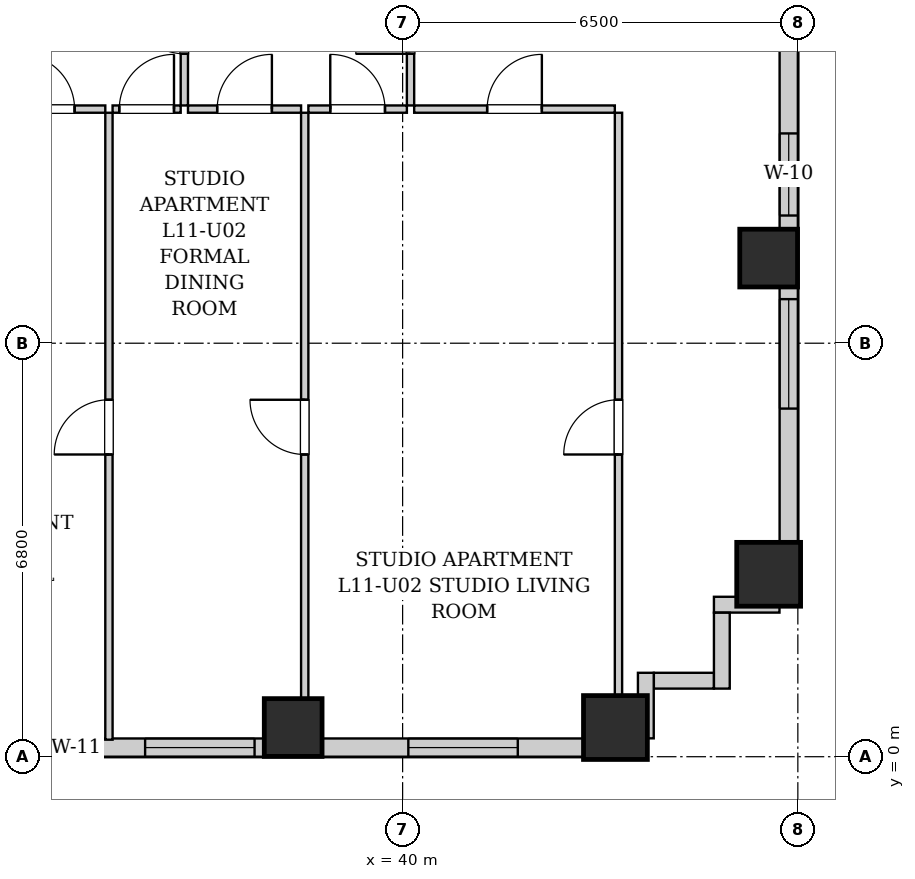
"""IFC4 building model, lengths in metres.
Left out: names, types, materials, properties, quantities, classifications, styles, units other than length and angle.
Written with IfcOpenShell. Run it as: python <this file> out.ifc"""

import sys

from ifc_helpers import new_model, si_unit, direction, frame, frame_2d, origin, origin_2d, place, context, subcontext, project, spatial, rectangle, extrude, element, fill, save


model = new_model("IFC4")
c1 = context("Model", 3, precision=1e-05, world=origin(), true_north=direction((0.0, 1.0)))
c2 = subcontext(c1, "Body", "Model", "MODEL_VIEW")
j1 = project(units=[si_unit("LENGTHUNIT", "METRE"), si_unit("PLANEANGLEUNIT", "RADIAN")], contexts=[c1])
p1 = place(None, origin())
s1 = spatial("IfcSite", under=j1, at=p1, CompositionType="ELEMENT")
p2 = place(p1, origin())
s2 = spatial("IfcBuilding", under=s1, at=p2, CompositionType="ELEMENT")
p3 = place(p2, frame((0.0, 0.0, 45.0)))
s3 = spatial("IfcBuildingStorey", under=s2, at=p3, CompositionType="ELEMENT", Elevation=45.0)
p4 = place(p3, frame((38.2, 0.48, 0.0), z_axis=(0.0, 0.0, 1.0), x_axis=(1.0, 0.0, 0.0)))
e1 = element("IfcColumn", 1, at=p4, inside=s3, PredefinedType="COLUMN", context=c2, shape_type="SweptSolid", body=[
    extrude(rectangle(XDim=0.95, YDim=0.95, at=origin_2d()), origin(), (0.0, 0.0, 1.0), 3.2),
])
for number, where, z_axis, x_axis in (
    (2, (43.5, 0.48, 0.0), (0.0, 0.0, 1.0), (1.0, 0.0, 0.0)),
    (3, (46.02, 3.0, 0.0), (0.0, 0.0, 1.0), (1.0, 0.0, 0.0)),
):
    element("IfcColumn", number, at=place(p3, frame(where, z_axis=z_axis, x_axis=x_axis)), inside=s3, PredefinedType="COLUMN", context=c2, shape_type="SweptSolid", body=[
        extrude(rectangle(XDim=1.05, YDim=1.05, at=origin_2d()), origin(), (0.0, 0.0, 1.0), 3.2),
    ])
p5 = place(p3, frame((46.02, 8.2, 0.0), z_axis=(0.0, 0.0, 1.0), x_axis=(1.0, 0.0, 0.0)))
e4 = element("IfcColumn", 4, at=p5, inside=s3, PredefinedType="COLUMN", context=c2, shape_type="SweptSolid", body=[
    extrude(rectangle(XDim=0.95, YDim=0.95, at=origin_2d()), origin(), (0.0, 0.0, 1.0), 3.2),
])
p6 = place(p3, frame((46.35, 45.1, 0.0), z_axis=(0.0, 0.0, 1.0), x_axis=(0.0, -1.0, 0.0)))
e5 = element("IfcWall", 5, at=p6, inside=s3, PredefinedType="SOLIDWALL", context=c2, shape_type="SweptSolid", body=[
    extrude(rectangle(XDim=42.6, YDim=0.3, at=frame_2d((21.3, 0.0))), origin(), (0.0, 0.0, 1.0), 1.975),
])
p7 = place(p6, frame((37.575, 0.0, 0.55)))
e6 = element("IfcOpeningElement", 6, at=p7, cuts=e5, PredefinedType="OPENING", context=c2, shape_type="SweptSolid", body=[
    extrude(rectangle(XDim=1.8, YDim=1.2, at=frame_2d((0.9, 0.6))), frame((0.0, 0.16, 0.0), z_axis=(0.0, -1.0, 0.0), x_axis=(1.0, 0.0, 0.0)), (0.0, 0.0, 1.0), 0.32),
])
p8 = place(p6, frame((34.85, 0.0, 0.55)))
e7 = element("IfcOpeningElement", 7, at=p8, cuts=e5, PredefinedType="OPENING", context=c2, shape_type="SweptSolid", body=[
    extrude(rectangle(XDim=1.35, YDim=1.2, at=frame_2d((0.675, 0.6))), frame((0.0, 0.16, 0.0), z_axis=(0.0, -1.0, 0.0), x_axis=(1.0, 0.0, 0.0)), (0.0, 0.0, 1.0), 0.32),
])
p9 = place(p6, frame((3.665, 0.0, 0.55)))
e8 = element("IfcOpeningElement", 8, at=p9, cuts=e5, PredefinedType="OPENING", context=c2, shape_type="SweptSolid", body=[
    extrude(rectangle(XDim=1.8, YDim=1.2, at=frame_2d((0.9, 0.6))), frame((0.0, 0.16, 0.0), z_axis=(0.0, -1.0, 0.0), x_axis=(1.0, 0.0, 0.0)), (0.0, 0.0, 1.0), 0.32),
])
p10 = place(p6, frame((1.185, 0.0, 0.55)))
e9 = element("IfcOpeningElement", 9, at=p10, cuts=e5, PredefinedType="OPENING", context=c2, shape_type="SweptSolid", body=[
    extrude(rectangle(XDim=1.35, YDim=1.2, at=frame_2d((0.675, 0.6))), frame((0.0, 0.16, 0.0), z_axis=(0.0, -1.0, 0.0), x_axis=(1.0, 0.0, 0.0)), (0.0, 0.0, 1.0), 0.32),
])
p11 = place(p6, frame((27.225, 0.0, 0.55)))
e10 = element("IfcOpeningElement", 10, at=p11, cuts=e5, PredefinedType="OPENING", context=c2, shape_type="SweptSolid", body=[
    extrude(rectangle(XDim=1.8, YDim=1.2, at=frame_2d((0.9, 0.6))), frame((0.0, 0.16, 0.0), z_axis=(0.0, -1.0, 0.0), x_axis=(1.0, 0.0, 0.0)), (0.0, 0.0, 1.0), 0.32),
])
p12 = place(p6, frame((17.1, 0.0, 0.55)))
e11 = element("IfcOpeningElement", 11, at=p12, cuts=e5, PredefinedType="OPENING", context=c2, shape_type="SweptSolid", body=[
    extrude(rectangle(XDim=1.8, YDim=1.2, at=frame_2d((0.9, 0.6))), frame((0.0, 0.16, 0.0), z_axis=(0.0, -1.0, 0.0), x_axis=(1.0, 0.0, 0.0)), (0.0, 0.0, 1.0), 0.32),
])
p13 = place(p3, frame((44.0, 0.15, 0.0), z_axis=(0.0, 0.0, 1.0), x_axis=(-1.0, 0.0, 0.0)))
e12 = element("IfcWall", 12, at=p13, inside=s3, PredefinedType="SOLIDWALL", context=c2, shape_type="SweptSolid", body=[
    extrude(rectangle(XDim=25.7, YDim=0.3, at=frame_2d((12.85, 0.0))), origin(), (0.0, 0.0, 1.0), 1.975),
])
p14 = place(p13, frame((22.471, 0.0, 0.55)))
e13 = element("IfcOpeningElement", 13, at=p14, cuts=e12, PredefinedType="OPENING", context=c2, shape_type="SweptSolid", body=[
    extrude(rectangle(XDim=1.8, YDim=1.2, at=frame_2d((0.9, 0.6))), frame((0.0, 0.16, 0.0), z_axis=(0.0, -1.0, 0.0), x_axis=(1.0, 0.0, 0.0)), (0.0, 0.0, 1.0), 0.32),
])
p15 = place(p13, frame((15.65, 0.0, 0.55)))
e14 = element("IfcOpeningElement", 14, at=p15, cuts=e12, PredefinedType="OPENING", context=c2, shape_type="SweptSolid", body=[
    extrude(rectangle(XDim=0.85, YDim=1.2, at=frame_2d((0.425, 0.6))), frame((0.0, 0.16, 0.0), z_axis=(0.0, -1.0, 0.0), x_axis=(1.0, 0.0, 0.0)), (0.0, 0.0, 1.0), 0.32),
])
p16 = place(p13, frame((12.777, 0.0, 0.55)))
e15 = element("IfcOpeningElement", 15, at=p16, cuts=e12, PredefinedType="OPENING", context=c2, shape_type="SweptSolid", body=[
    extrude(rectangle(XDim=1.8, YDim=1.2, at=frame_2d((0.9, 0.6))), frame((0.0, 0.16, 0.0), z_axis=(0.0, -1.0, 0.0), x_axis=(1.0, 0.0, 0.0)), (0.0, 0.0, 1.0), 0.32),
])
p17 = place(p13, frame((9.315, 0.0, 0.55)))
e16 = element("IfcOpeningElement", 16, at=p17, cuts=e12, PredefinedType="OPENING", context=c2, shape_type="SweptSolid", body=[
    extrude(rectangle(XDim=0.85, YDim=1.2, at=frame_2d((0.425, 0.6))), frame((0.0, 0.16, 0.0), z_axis=(0.0, -1.0, 0.0), x_axis=(1.0, 0.0, 0.0)), (0.0, 0.0, 1.0), 0.32),
])
p18 = place(p13, frame((6.435, 0.0, 0.55)))
e17 = element("IfcOpeningElement", 17, at=p18, cuts=e12, PredefinedType="OPENING", context=c2, shape_type="SweptSolid", body=[
    extrude(rectangle(XDim=1.8, YDim=1.2, at=frame_2d((0.9, 0.6))), frame((0.0, 0.16, 0.0), z_axis=(0.0, -1.0, 0.0), x_axis=(1.0, 0.0, 0.0)), (0.0, 0.0, 1.0), 0.32),
])
p19 = place(p13, frame((2.106, 0.0, 0.55)))
e18 = element("IfcOpeningElement", 18, at=p19, cuts=e12, PredefinedType="OPENING", context=c2, shape_type="SweptSolid", body=[
    extrude(rectangle(XDim=1.8, YDim=1.2, at=frame_2d((0.9, 0.6))), frame((0.0, 0.16, 0.0), z_axis=(0.0, -1.0, 0.0), x_axis=(1.0, 0.0, 0.0)), (0.0, 0.0, 1.0), 0.32),
])
p20 = place(p3, frame((46.198, 2.5, 0.0), z_axis=(0.0, 0.0, 1.0), x_axis=(-1.0, 0.0, 0.0)))
e19 = element("IfcWall", 19, at=p20, inside=s3, PredefinedType="SOLIDWALL", context=c2, shape_type="SweptSolid", body=[
    extrude(rectangle(XDim=1.078, YDim=0.26, at=frame_2d((0.539, 0.0))), origin(), (0.0, 0.0, 1.0), 2.94),
])
p21 = place(p3, frame((45.25, 2.368, 0.0), z_axis=(0.0, 0.0, 1.0), x_axis=(0.0, -1.0, 0.0)))
e20 = element("IfcWall", 20, at=p21, inside=s3, PredefinedType="SOLIDWALL", context=c2, shape_type="SweptSolid", body=[
    extrude(rectangle(XDim=1.248, YDim=0.26, at=frame_2d((0.624, 0.0))), origin(), (0.0, 0.0, 1.0), 2.94),
])
p22 = place(p3, frame((45.118, 1.25, 0.0), z_axis=(0.0, 0.0, 1.0), x_axis=(-1.0, 0.0, 0.0)))
e21 = element("IfcWall", 21, at=p22, inside=s3, PredefinedType="SOLIDWALL", context=c2, shape_type="SweptSolid", body=[
    extrude(rectangle(XDim=0.986, YDim=0.26, at=frame_2d((0.493, 0.0))), origin(), (0.0, 0.0, 1.0), 2.94),
])
p23 = place(p3, frame((44.0, 1.38, 0.0), z_axis=(0.0, 0.0, 1.0), x_axis=(0.0, -1.0, 0.0)))
e22 = element("IfcWall", 22, at=p23, inside=s3, PredefinedType="SOLIDWALL", context=c2, shape_type="SweptSolid", body=[
    extrude(rectangle(XDim=1.078, YDim=0.26, at=frame_2d((0.539, 0.0))), origin(), (0.0, 0.0, 1.0), 2.94),
])
p24 = place(p3, frame((36.41, 10.71, 0.0), z_axis=(0.0, 0.0, 1.0), x_axis=(0.0, 1.0, 0.0)))
e23 = element("IfcWall", 23, at=p24, inside=s3, PredefinedType="PARTITIONING", context=c2, shape_type="SweptSolid", body=[
    extrude(rectangle(XDim=2.6, YDim=0.12, at=frame_2d((1.3, 0.0))), origin(), (0.0, 0.0, 1.0), 2.94),
])
p25 = place(p24, frame((0.85, 0.0, 0.0)))
e24 = element("IfcOpeningElement", 24, at=p25, cuts=e23, PredefinedType="OPENING", context=c2, shape_type="SweptSolid", body=[
    extrude(rectangle(XDim=0.9, YDim=2.05, at=frame_2d((0.45, 1.025))), frame((0.0, 0.07, 0.0), z_axis=(0.0, -1.0, 0.0), x_axis=(1.0, 0.0, 0.0)), (0.0, 0.0, 1.0), 0.14),
])
p26 = place(p3, frame((33.2, 10.65, 0.0), z_axis=(0.0, 0.0, 1.0), x_axis=(1.0, 0.0, 0.0)))
e25 = element("IfcWall", 25, at=p26, inside=s3, PredefinedType="PARTITIONING", context=c2, shape_type="SweptSolid", body=[
    extrude(rectangle(XDim=1.91, YDim=0.12, at=frame_2d((0.955, 0.0))), origin(), (0.0, 0.0, 1.0), 2.94),
])
p27 = place(p26, frame((0.505, 0.0, 0.0)))
e26 = element("IfcOpeningElement", 26, at=p27, cuts=e25, PredefinedType="OPENING", context=c2, shape_type="SweptSolid", body=[
    extrude(rectangle(XDim=0.9, YDim=2.05, at=frame_2d((0.45, 1.025))), frame((0.0, 0.07, 0.0), z_axis=(0.0, -1.0, 0.0), x_axis=(1.0, 0.0, 0.0)), (0.0, 0.0, 1.0), 0.14),
])
p28 = place(p3, frame((35.23, 10.65, 0.0), z_axis=(0.0, 0.0, 1.0), x_axis=(1.0, 0.0, 0.0)))
e27 = element("IfcWall", 27, at=p28, inside=s3, PredefinedType="PARTITIONING", context=c2, shape_type="SweptSolid", body=[
    extrude(rectangle(XDim=1.12, YDim=0.12, at=frame_2d((0.56, 0.0))), origin(), (0.0, 0.0, 1.0), 2.94),
])
p29 = place(p28, frame((0.11, 0.0, 0.0)))
e28 = element("IfcOpeningElement", 28, at=p29, cuts=e27, PredefinedType="OPENING", context=c2, shape_type="SweptSolid", body=[
    extrude(rectangle(XDim=0.9, YDim=2.05, at=frame_2d((0.45, 1.025))), frame((0.0, 0.07, 0.0), z_axis=(0.0, -1.0, 0.0), x_axis=(1.0, 0.0, 0.0)), (0.0, 0.0, 1.0), 0.14),
])
p30 = place(p3, frame((40.13, 10.71, 0.0), z_axis=(0.0, 0.0, 1.0), x_axis=(0.0, 1.0, 0.0)))
e29 = element("IfcWall", 29, at=p30, inside=s3, PredefinedType="PARTITIONING", context=c2, shape_type="SweptSolid", body=[
    extrude(rectangle(XDim=2.6, YDim=0.12, at=frame_2d((1.3, 0.0))), origin(), (0.0, 0.0, 1.0), 2.94),
])
p31 = place(p30, frame((0.85, 0.0, 0.0)))
e30 = element("IfcOpeningElement", 30, at=p31, cuts=e29, PredefinedType="OPENING", context=c2, shape_type="SweptSolid", body=[
    extrude(rectangle(XDim=0.9, YDim=2.05, at=frame_2d((0.45, 1.025))), frame((0.0, 0.07, 0.0), z_axis=(0.0, -1.0, 0.0), x_axis=(1.0, 0.0, 0.0)), (0.0, 0.0, 1.0), 0.14),
])
p32 = place(p3, frame((36.47, 10.65, 0.0), z_axis=(0.0, 0.0, 1.0), x_axis=(1.0, 0.0, 0.0)))
e31 = element("IfcWall", 31, at=p32, inside=s3, PredefinedType="PARTITIONING", context=c2, shape_type="SweptSolid", body=[
    extrude(rectangle(XDim=1.86, YDim=0.12, at=frame_2d((0.93, 0.0))), origin(), (0.0, 0.0, 1.0), 2.94),
])
p33 = place(p32, frame((0.48, 0.0, 0.0)))
e32 = element("IfcOpeningElement", 32, at=p33, cuts=e31, PredefinedType="OPENING", context=c2, shape_type="SweptSolid", body=[
    extrude(rectangle(XDim=0.9, YDim=2.05, at=frame_2d((0.45, 1.025))), frame((0.0, 0.07, 0.0), z_axis=(0.0, -1.0, 0.0), x_axis=(1.0, 0.0, 0.0)), (0.0, 0.0, 1.0), 0.14),
])
p34 = place(p3, frame((38.45, 10.65, 0.0), z_axis=(0.0, 0.0, 1.0), x_axis=(1.0, 0.0, 0.0)))
e33 = element("IfcWall", 33, at=p34, inside=s3, PredefinedType="PARTITIONING", context=c2, shape_type="SweptSolid", body=[
    extrude(rectangle(XDim=1.62, YDim=0.12, at=frame_2d((0.81, 0.0))), origin(), (0.0, 0.0, 1.0), 2.94),
])
p35 = place(p34, frame((0.36, 0.0, 0.0)))
e34 = element("IfcOpeningElement", 34, at=p35, cuts=e33, PredefinedType="OPENING", context=c2, shape_type="SweptSolid", body=[
    extrude(rectangle(XDim=0.9, YDim=2.05, at=frame_2d((0.45, 1.025))), frame((0.0, 0.07, 0.0), z_axis=(0.0, -1.0, 0.0), x_axis=(1.0, 0.0, 0.0)), (0.0, 0.0, 1.0), 0.14),
])
p36 = place(p3, frame((40.19, 10.65, 0.0), z_axis=(0.0, 0.0, 1.0), x_axis=(1.0, 0.0, 0.0)))
e35 = element("IfcWall", 35, at=p36, inside=s3, PredefinedType="PARTITIONING", context=c2, shape_type="SweptSolid", body=[
    extrude(rectangle(XDim=3.3, YDim=0.12, at=frame_2d((1.65, 0.0))), origin(), (0.0, 0.0, 1.0), 2.94),
])
p37 = place(p36, frame((1.2, 0.0, 0.0)))
e36 = element("IfcOpeningElement", 36, at=p37, cuts=e35, PredefinedType="OPENING", context=c2, shape_type="SweptSolid", body=[
    extrude(rectangle(XDim=0.9, YDim=2.05, at=frame_2d((0.45, 1.025))), frame((0.0, 0.07, 0.0), z_axis=(0.0, -1.0, 0.0), x_axis=(1.0, 0.0, 0.0)), (0.0, 0.0, 1.0), 0.14),
])
p38 = place(p3, frame((35.17, 0.28, 0.0), z_axis=(0.0, 0.0, 1.0), x_axis=(0.0, 1.0, 0.0)))
e37 = element("IfcWall", 37, at=p38, inside=s3, PredefinedType="PARTITIONING", context=c2, shape_type="SweptSolid", body=[
    extrude(rectangle(XDim=10.31, YDim=0.12, at=frame_2d((5.155, 0.0))), origin(), (0.0, 0.0, 1.0), 2.94),
])
p39 = place(p38, frame((4.69, 0.0, 0.0)))
e38 = element("IfcOpeningElement", 38, at=p39, cuts=e37, PredefinedType="OPENING", context=c2, shape_type="SweptSolid", body=[
    extrude(rectangle(XDim=0.9, YDim=2.05, at=frame_2d((0.45, 1.025))), frame((0.0, 0.07, 0.0), z_axis=(0.0, -1.0, 0.0), x_axis=(1.0, 0.0, 0.0)), (0.0, 0.0, 1.0), 0.14),
])
p40 = place(p3, frame((38.39, 0.28, 0.0), z_axis=(0.0, 0.0, 1.0), x_axis=(0.0, 1.0, 0.0)))
e39 = element("IfcWall", 39, at=p40, inside=s3, PredefinedType="PARTITIONING", context=c2, shape_type="SweptSolid", body=[
    extrude(rectangle(XDim=10.31, YDim=0.12, at=frame_2d((5.155, 0.0))), origin(), (0.0, 0.0, 1.0), 2.94),
])
p41 = place(p40, frame((4.69, 0.0, 0.0)))
e40 = element("IfcOpeningElement", 40, at=p41, cuts=e39, PredefinedType="OPENING", context=c2, shape_type="SweptSolid", body=[
    extrude(rectangle(XDim=0.9, YDim=2.05, at=frame_2d((0.45, 1.025))), frame((0.0, 0.07, 0.0), z_axis=(0.0, -1.0, 0.0), x_axis=(1.0, 0.0, 0.0)), (0.0, 0.0, 1.0), 0.14),
])
p42 = place(p3, frame((43.55, 0.28, 0.0), z_axis=(0.0, 0.0, 1.0), x_axis=(0.0, 1.0, 0.0)))
e41 = element("IfcWall", 41, at=p42, inside=s3, PredefinedType="PARTITIONING", context=c2, shape_type="SweptSolid", body=[
    extrude(rectangle(XDim=10.31, YDim=0.12, at=frame_2d((5.155, 0.0))), origin(), (0.0, 0.0, 1.0), 2.94),
])
p43 = place(p42, frame((4.69, 0.0, 0.0)))
e42 = element("IfcOpeningElement", 42, at=p43, cuts=e41, PredefinedType="OPENING", context=c2, shape_type="SweptSolid", body=[
    extrude(rectangle(XDim=0.9, YDim=2.05, at=frame_2d((0.45, 1.025))), frame((0.0, 0.07, 0.0), z_axis=(0.0, -1.0, 0.0), x_axis=(1.0, 0.0, 0.0)), (0.0, 0.0, 1.0), 0.14),
])
p44 = place(p25, origin())
e43 = element("IfcDoor", 43, at=p44, inside=s3, OperationType="SINGLE_SWING_RIGHT", PredefinedType="DOOR", context=c2, shape_type="SweptSolid", body=[
    extrude(rectangle(XDim=0.9, YDim=2.05, at=frame_2d((0.45, 1.025))), frame((0.0, 0.025, 0.0), z_axis=(0.0, -1.0, 0.0), x_axis=(1.0, 0.0, 0.0)), (0.0, 0.0, 1.0), 0.05),
])
fill(e24, e43)
p45 = place(p27, origin())
e44 = element("IfcDoor", 44, at=p45, inside=s3, OperationType="SINGLE_SWING_LEFT", PredefinedType="DOOR", context=c2, shape_type="SweptSolid", body=[
    extrude(rectangle(XDim=0.9, YDim=2.05, at=frame_2d((0.45, 1.025))), frame((0.0, 0.025, 0.0), z_axis=(0.0, -1.0, 0.0), x_axis=(1.0, 0.0, 0.0)), (0.0, 0.0, 1.0), 0.05),
])
fill(e26, e44)
p46 = place(p29, origin())
e45 = element("IfcDoor", 45, at=p46, inside=s3, OperationType="SINGLE_SWING_RIGHT", PredefinedType="DOOR", context=c2, shape_type="SweptSolid", body=[
    extrude(rectangle(XDim=0.9, YDim=2.05, at=frame_2d((0.45, 1.025))), frame((0.0, 0.025, 0.0), z_axis=(0.0, -1.0, 0.0), x_axis=(1.0, 0.0, 0.0)), (0.0, 0.0, 1.0), 0.05),
])
fill(e28, e45)
p47 = place(p31, origin())
e46 = element("IfcDoor", 46, at=p47, inside=s3, OperationType="SINGLE_SWING_LEFT", PredefinedType="DOOR", context=c2, shape_type="SweptSolid", body=[
    extrude(rectangle(XDim=0.9, YDim=2.05, at=frame_2d((0.45, 1.025))), frame((0.0, 0.025, 0.0), z_axis=(0.0, -1.0, 0.0), x_axis=(1.0, 0.0, 0.0)), (0.0, 0.0, 1.0), 0.05),
])
fill(e30, e46)
p48 = place(p33, origin())
e47 = element("IfcDoor", 47, at=p48, inside=s3, OperationType="SINGLE_SWING_RIGHT", PredefinedType="DOOR", context=c2, shape_type="SweptSolid", body=[
    extrude(rectangle(XDim=0.9, YDim=2.05, at=frame_2d((0.45, 1.025))), frame((0.0, 0.025, 0.0), z_axis=(0.0, -1.0, 0.0), x_axis=(1.0, 0.0, 0.0)), (0.0, 0.0, 1.0), 0.05),
])
fill(e32, e47)
p49 = place(p35, origin())
e48 = element("IfcDoor", 48, at=p49, inside=s3, OperationType="SINGLE_SWING_LEFT", PredefinedType="DOOR", context=c2, shape_type="SweptSolid", body=[
    extrude(rectangle(XDim=0.9, YDim=2.05, at=frame_2d((0.45, 1.025))), frame((0.0, 0.025, 0.0), z_axis=(0.0, -1.0, 0.0), x_axis=(1.0, 0.0, 0.0)), (0.0, 0.0, 1.0), 0.05),
])
fill(e34, e48)
p50 = place(p37, origin())
e49 = element("IfcDoor", 49, at=p50, inside=s3, OperationType="SINGLE_SWING_RIGHT", PredefinedType="DOOR", context=c2, shape_type="SweptSolid", body=[
    extrude(rectangle(XDim=0.9, YDim=2.05, at=frame_2d((0.45, 1.025))), frame((0.0, 0.025, 0.0), z_axis=(0.0, -1.0, 0.0), x_axis=(1.0, 0.0, 0.0)), (0.0, 0.0, 1.0), 0.05),
])
fill(e36, e49)
p51 = place(p39, origin())
e50 = element("IfcDoor", 50, at=p51, inside=s3, OperationType="SINGLE_SWING_LEFT", PredefinedType="DOOR", context=c2, shape_type="SweptSolid", body=[
    extrude(rectangle(XDim=0.9, YDim=2.05, at=frame_2d((0.45, 1.025))), frame((0.0, 0.025, 0.0), z_axis=(0.0, -1.0, 0.0), x_axis=(1.0, 0.0, 0.0)), (0.0, 0.0, 1.0), 0.05),
])
fill(e38, e50)
p52 = place(p41, origin())
e51 = element("IfcDoor", 51, at=p52, inside=s3, OperationType="SINGLE_SWING_RIGHT", PredefinedType="DOOR", context=c2, shape_type="SweptSolid", body=[
    extrude(rectangle(XDim=0.9, YDim=2.05, at=frame_2d((0.45, 1.025))), frame((0.0, 0.025, 0.0), z_axis=(0.0, -1.0, 0.0), x_axis=(1.0, 0.0, 0.0)), (0.0, 0.0, 1.0), 0.05),
])
fill(e40, e51)
p53 = place(p43, origin())
e52 = element("IfcDoor", 52, at=p53, inside=s3, OperationType="SINGLE_SWING_LEFT", PredefinedType="DOOR", context=c2, shape_type="SweptSolid", body=[
    extrude(rectangle(XDim=0.9, YDim=2.05, at=frame_2d((0.45, 1.025))), frame((0.0, 0.025, 0.0), z_axis=(0.0, -1.0, 0.0), x_axis=(1.0, 0.0, 0.0)), (0.0, 0.0, 1.0), 0.05),
])
fill(e42, e52)
p54 = place(p17, origin())
e53 = element("IfcWindow", 53, at=p54, inside=s3, PartitioningType="SINGLE_PANEL", PredefinedType="WINDOW", context=c2, shape_type="SweptSolid", body=[
    extrude(rectangle(XDim=0.85, YDim=1.2, at=frame_2d((0.425, 0.6))), frame((0.0, 0.03, 0.0), z_axis=(0.0, -1.0, 0.0), x_axis=(1.0, 0.0, 0.0)), (0.0, 0.0, 1.0), 0.06),
])
fill(e16, e53)
p55 = place(p18, origin())
e54 = element("IfcWindow", 54, at=p55, inside=s3, PartitioningType="DOUBLE_PANEL_VERTICAL", PredefinedType="WINDOW", context=c2, shape_type="SweptSolid", body=[
    extrude(rectangle(XDim=1.8, YDim=1.2, at=frame_2d((0.9, 0.6))), frame((0.0, 0.03, 0.0), z_axis=(0.0, -1.0, 0.0), x_axis=(1.0, 0.0, 0.0)), (0.0, 0.0, 1.0), 0.06),
])
fill(e17, e54)
p56 = place(p19, origin())
e55 = element("IfcWindow", 55, at=p56, inside=s3, PartitioningType="DOUBLE_PANEL_VERTICAL", PredefinedType="WINDOW", context=c2, shape_type="SweptSolid", body=[
    extrude(rectangle(XDim=1.8, YDim=1.2, at=frame_2d((0.9, 0.6))), frame((0.0, 0.03, 0.0), z_axis=(0.0, -1.0, 0.0), x_axis=(1.0, 0.0, 0.0)), (0.0, 0.0, 1.0), 0.06),
])
fill(e18, e55)
p57 = place(p7, origin())
e56 = element("IfcWindow", 56, at=p57, inside=s3, PartitioningType="DOUBLE_PANEL_VERTICAL", PredefinedType="WINDOW", context=c2, shape_type="SweptSolid", body=[
    extrude(rectangle(XDim=1.8, YDim=1.2, at=frame_2d((0.9, 0.6))), frame((0.0, 0.03, 0.0), z_axis=(0.0, -1.0, 0.0), x_axis=(1.0, 0.0, 0.0)), (0.0, 0.0, 1.0), 0.06),
])
fill(e6, e56)
p58 = place(p8, origin())
e57 = element("IfcWindow", 57, at=p58, inside=s3, PartitioningType="SINGLE_PANEL", PredefinedType="WINDOW", context=c2, shape_type="SweptSolid", body=[
    extrude(rectangle(XDim=1.35, YDim=1.2, at=frame_2d((0.675, 0.6))), frame((0.0, 0.03, 0.0), z_axis=(0.0, -1.0, 0.0), x_axis=(1.0, 0.0, 0.0)), (0.0, 0.0, 1.0), 0.06),
])
fill(e7, e57)
save(model, sys.argv[1])
